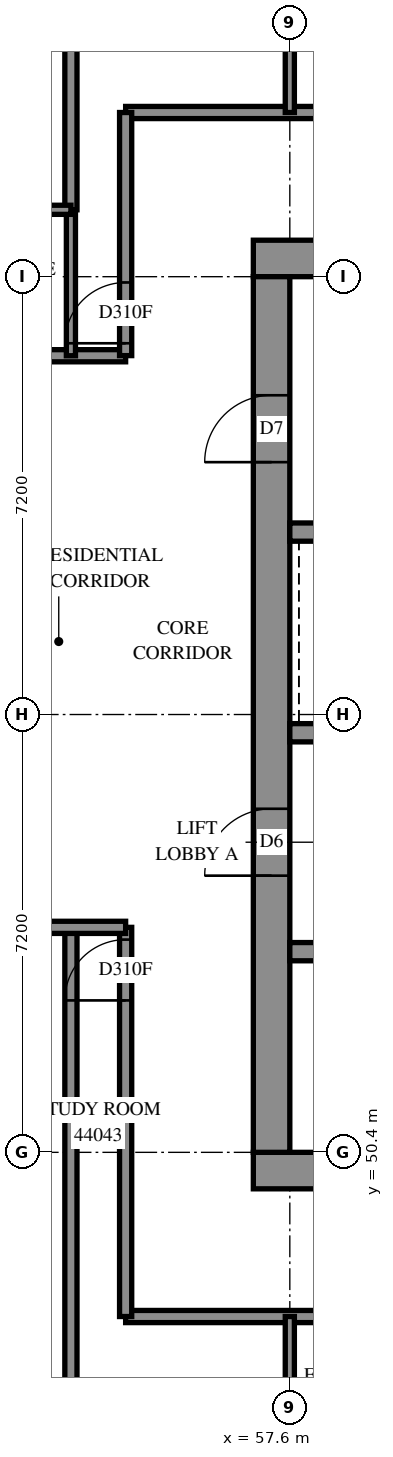
"""IFC4 building model, lengths in metres.
Left out: names, types, materials, properties, quantities, classifications, styles, units other than length and angle.
Written with IfcOpenShell. Run it as: python <this file> out.ifc"""

import sys

from ifc_helpers import new_model, si_unit, direction, frame, frame_2d, origin, place, context, subcontext, project, spatial, rectangle, extrude, element, fill, save


model = new_model("IFC4")
c1 = context("Model", 3, precision=1e-05, world=origin(), true_north=direction((0.0, 1.0)))
c2 = subcontext(c1, "Body", "Model", "MODEL_VIEW")
j1 = project(units=[si_unit("LENGTHUNIT", "METRE"), si_unit("PLANEANGLEUNIT", "RADIAN")], contexts=[c1])
p1 = place(None, origin())
s1 = spatial("IfcSite", under=j1, at=p1, CompositionType="ELEMENT")
p2 = place(p1, origin())
s2 = spatial("IfcBuilding", under=s1, at=p2, CompositionType="ELEMENT")
p3 = place(p2, frame((0.0, 0.0, 162.6)))
s3 = spatial("IfcBuildingStorey", under=s2, at=p3, CompositionType="ELEMENT", Elevation=162.6)
p4 = place(p3, frame((57.0, 50.1, -0.3), z_axis=(0.0, 0.0, 1.0), x_axis=(1.0, 0.0, 0.0)))
e1 = element("IfcWall", 1, at=p4, inside=s3, PredefinedType="SHEAR", context=c2, shape_type="SweptSolid", body=[
    extrude(rectangle(XDim=15.6, YDim=0.6, at=frame_2d((7.8, 0.0))), origin(), (0.0, 0.0, 1.0), 2.7),
])
p5 = place(p3, frame((57.0, 65.1, -0.3), z_axis=(0.0, 0.0, 1.0), x_axis=(1.0, 0.0, 0.0)))
e2 = element("IfcWall", 2, at=p5, inside=s3, PredefinedType="SHEAR", context=c2, shape_type="SweptSolid", body=[
    extrude(rectangle(XDim=15.6, YDim=0.6, at=frame_2d((7.8, 0.0))), origin(), (0.0, 0.0, 1.0), 2.7),
])
p6 = place(p5, frame((10.6, 0.0, 0.3)))
e3 = element("IfcOpeningElement", 3, at=p6, cuts=e2, PredefinedType="OPENING", context=c2, shape_type="SweptSolid", body=[
    extrude(rectangle(XDim=0.8, YDim=2.1, at=frame_2d((0.4, 1.05))), frame((0.0, 0.31, 0.0), z_axis=(0.0, -1.0, 0.0), x_axis=(1.0, 0.0, 0.0)), (0.0, 0.0, 1.0), 0.62),
])
p7 = place(p3, frame((57.3, 50.4, -0.3), z_axis=(0.0, 0.0, 1.0), x_axis=(0.0, 1.0, 0.0)))
e4 = element("IfcWall", 4, at=p7, inside=s3, PredefinedType="SHEAR", context=c2, shape_type="SweptSolid", body=[
    extrude(rectangle(XDim=14.4, YDim=0.6, at=frame_2d((7.2, 0.0))), origin(), (0.0, 0.0, 1.0), 2.7),
])
p8 = place(p7, frame((4.55, 0.0, 0.3)))
e5 = element("IfcOpeningElement", 5, at=p8, cuts=e4, PredefinedType="OPENING", context=c2, shape_type="SweptSolid", body=[
    extrude(rectangle(XDim=1.1, YDim=2.1, at=frame_2d((0.55, 1.05))), frame((0.0, 0.31, 0.0), z_axis=(0.0, -1.0, 0.0), x_axis=(1.0, 0.0, 0.0)), (0.0, 0.0, 1.0), 0.62),
])
p9 = place(p7, frame((11.35, 0.0, 0.3)))
e6 = element("IfcOpeningElement", 6, at=p9, cuts=e4, PredefinedType="OPENING", context=c2, shape_type="SweptSolid", body=[
    extrude(rectangle(XDim=1.1, YDim=2.1, at=frame_2d((0.55, 1.05))), frame((0.0, 0.31, 0.0), z_axis=(0.0, -1.0, 0.0), x_axis=(1.0, 0.0, 0.0)), (0.0, 0.0, 1.0), 0.62),
])
p10 = place(p3, frame((57.6, 53.7, 0.0), z_axis=(0.0, 0.0, 1.0), x_axis=(1.0, 0.0, 0.0)))
e7 = element("IfcWall", 7, at=p10, inside=s3, PredefinedType="SOLIDWALL", context=c2, shape_type="SweptSolid", body=[
    extrude(rectangle(XDim=14.4, YDim=0.3, at=frame_2d((7.2, 0.0))), origin(), (0.0, 0.0, 1.0), 3.1),
])
p11 = place(p10, frame((1.35, 0.0, 0.0)))
e8 = element("IfcOpeningElement", 8, at=p11, cuts=e7, PredefinedType="OPENING", context=c2, shape_type="SweptSolid", body=[
    extrude(rectangle(XDim=0.9, YDim=2.1, at=frame_2d((0.45, 1.05))), frame((0.0, 0.16, 0.0), z_axis=(0.0, -1.0, 0.0), x_axis=(1.0, 0.0, 0.0)), (0.0, 0.0, 1.0), 0.32),
])
p12 = place(p10, frame((4.95, 0.0, 0.0)))
e9 = element("IfcOpeningElement", 9, at=p12, cuts=e7, PredefinedType="OPENING", context=c2, shape_type="SweptSolid", body=[
    extrude(rectangle(XDim=0.9, YDim=2.1, at=frame_2d((0.45, 1.05))), frame((0.0, 0.16, 0.0), z_axis=(0.0, -1.0, 0.0), x_axis=(1.0, 0.0, 0.0)), (0.0, 0.0, 1.0), 0.32),
])
p13 = place(p10, frame((8.55, 0.0, 0.0)))
e10 = element("IfcOpeningElement", 10, at=p13, cuts=e7, PredefinedType="OPENING", context=c2, shape_type="SweptSolid", body=[
    extrude(rectangle(XDim=0.9, YDim=2.1, at=frame_2d((0.45, 1.05))), frame((0.0, 0.16, 0.0), z_axis=(0.0, -1.0, 0.0), x_axis=(1.0, 0.0, 0.0)), (0.0, 0.0, 1.0), 0.32),
])
p14 = place(p10, frame((12.05, 0.0, 0.0)))
e11 = element("IfcOpeningElement", 11, at=p14, cuts=e7, PredefinedType="OPENING", context=c2, shape_type="SweptSolid", body=[
    extrude(rectangle(XDim=1.1, YDim=2.1, at=frame_2d((0.55, 1.05))), frame((0.0, 0.16, 0.0), z_axis=(0.0, -1.0, 0.0), x_axis=(1.0, 0.0, 0.0)), (0.0, 0.0, 1.0), 0.32),
])
p15 = place(p3, frame((57.6, 57.3, 0.0), z_axis=(0.0, 0.0, 1.0), x_axis=(1.0, 0.0, 0.0)))
e12 = element("IfcWall", 12, at=p15, inside=s3, PredefinedType="SOLIDWALL", context=c2, shape_type="SweptSolid", body=[
    extrude(rectangle(XDim=14.4, YDim=0.3, at=frame_2d((7.2, 0.0))), origin(), (0.0, 0.0, 1.0), 3.1),
])
p16 = place(p15, frame((1.25, 0.0, 0.0)))
e13 = element("IfcOpeningElement", 13, at=p16, cuts=e12, PredefinedType="OPENING", context=c2, shape_type="SweptSolid", body=[
    extrude(rectangle(XDim=1.1, YDim=2.1, at=frame_2d((0.55, 1.05))), frame((0.0, 0.16, 0.0), z_axis=(0.0, -1.0, 0.0), x_axis=(1.0, 0.0, 0.0)), (0.0, 0.0, 1.0), 0.32),
])
p17 = place(p15, frame((4.85, 0.0, 0.0)))
e14 = element("IfcOpeningElement", 14, at=p17, cuts=e12, PredefinedType="OPENING", context=c2, shape_type="SweptSolid", body=[
    extrude(rectangle(XDim=1.1, YDim=2.1, at=frame_2d((0.55, 1.05))), frame((0.0, 0.16, 0.0), z_axis=(0.0, -1.0, 0.0), x_axis=(1.0, 0.0, 0.0)), (0.0, 0.0, 1.0), 0.32),
])
p18 = place(p15, frame((8.45, 0.0, 0.0)))
e15 = element("IfcOpeningElement", 15, at=p18, cuts=e12, PredefinedType="OPENING", context=c2, shape_type="SweptSolid", body=[
    extrude(rectangle(XDim=1.1, YDim=2.1, at=frame_2d((0.55, 1.05))), frame((0.0, 0.16, 0.0), z_axis=(0.0, -1.0, 0.0), x_axis=(1.0, 0.0, 0.0)), (0.0, 0.0, 1.0), 0.32),
])
p19 = place(p15, frame((12.05, 0.0, 0.0)))
e16 = element("IfcOpeningElement", 16, at=p19, cuts=e12, PredefinedType="OPENING", context=c2, shape_type="SweptSolid", body=[
    extrude(rectangle(XDim=1.1, YDim=2.1, at=frame_2d((0.55, 1.05))), frame((0.0, 0.16, 0.0), z_axis=(0.0, -1.0, 0.0), x_axis=(1.0, 0.0, 0.0)), (0.0, 0.0, 1.0), 0.32),
])
p20 = place(p3, frame((57.6, 60.6, 0.0), z_axis=(0.0, 0.0, 1.0), x_axis=(1.0, 0.0, 0.0)))
e17 = element("IfcWall", 17, at=p20, inside=s3, PredefinedType="SOLIDWALL", context=c2, shape_type="SweptSolid", body=[
    extrude(rectangle(XDim=7.2, YDim=0.3, at=frame_2d((3.6, 0.0))), origin(), (0.0, 0.0, 1.0), 3.1),
])
p21 = place(p3, frame((54.9, 67.5, 0.0), z_axis=(0.0, 0.0, 1.0), x_axis=(1.0, 0.0, 0.0)))
e18 = element("IfcWall", 18, at=p21, inside=s3, PredefinedType="PARTITIONING", context=c2, shape_type="SweptSolid", body=[
    extrude(rectangle(XDim=19.8, YDim=0.2, at=frame_2d((9.9, 0.0))), origin(), (0.0, 0.0, 1.0), 3.1),
])
p22 = place(p21, frame((6.599, 0.0, 0.0)))
e19 = element("IfcOpeningElement", 19, at=p22, cuts=e18, PredefinedType="OPENING", context=c2, shape_type="SweptSolid", body=[
    extrude(rectangle(XDim=0.9, YDim=2.1, at=frame_2d((0.45, 1.05))), frame((0.0, 0.11, 0.0), z_axis=(0.0, -1.0, 0.0), x_axis=(1.0, 0.0, 0.0)), (0.0, 0.0, 1.0), 0.22),
])
p23 = place(p21, frame((14.101, 0.0, 0.0)))
e20 = element("IfcOpeningElement", 20, at=p23, cuts=e18, PredefinedType="OPENING", context=c2, shape_type="SweptSolid", body=[
    extrude(rectangle(XDim=0.9, YDim=2.1, at=frame_2d((0.45, 1.05))), frame((0.0, 0.11, 0.0), z_axis=(0.0, -1.0, 0.0), x_axis=(1.0, 0.0, 0.0)), (0.0, 0.0, 1.0), 0.22),
])
p24 = place(p3, frame((54.9, 47.7, 0.0), z_axis=(0.0, 0.0, 1.0), x_axis=(1.0, 0.0, 0.0)))
e21 = element("IfcWall", 21, at=p24, inside=s3, PredefinedType="PARTITIONING", context=c2, shape_type="SweptSolid", body=[
    extrude(rectangle(XDim=19.326, YDim=0.2, at=frame_2d((9.663, 0.0))), origin(), (0.0, 0.0, 1.0), 3.1),
])
p25 = place(p24, frame((6.599, 0.0, 0.0)))
e22 = element("IfcOpeningElement", 22, at=p25, cuts=e21, PredefinedType="OPENING", context=c2, shape_type="SweptSolid", body=[
    extrude(rectangle(XDim=0.9, YDim=2.1, at=frame_2d((0.45, 1.05))), frame((0.0, 0.11, 0.0), z_axis=(0.0, -1.0, 0.0), x_axis=(1.0, 0.0, 0.0)), (0.0, 0.0, 1.0), 0.22),
])
p26 = place(p24, frame((13.799, 0.0, 0.0)))
e23 = element("IfcOpeningElement", 23, at=p26, cuts=e21, PredefinedType="OPENING", context=c2, shape_type="SweptSolid", body=[
    extrude(rectangle(XDim=0.9, YDim=2.1, at=frame_2d((0.45, 1.05))), frame((0.0, 0.11, 0.0), z_axis=(0.0, -1.0, 0.0), x_axis=(1.0, 0.0, 0.0)), (0.0, 0.0, 1.0), 0.22),
])
p27 = place(p3, frame((40.702, 63.5, 0.0), z_axis=(0.0, 0.0, 1.0), x_axis=(1.0, 0.0, 0.0)))
e24 = element("IfcWall", 24, at=p27, inside=s3, PredefinedType="PARTITIONING", context=c2, shape_type="SweptSolid", body=[
    extrude(rectangle(XDim=14.198, YDim=0.2, at=frame_2d((7.099, 0.0))), origin(), (0.0, 0.0, 1.0), 3.1),
])
p28 = place(p27, frame((6.692, 0.0, 0.0)))
e25 = element("IfcOpeningElement", 25, at=p28, cuts=e24, PredefinedType="OPENING", context=c2, shape_type="SweptSolid", body=[
    extrude(rectangle(XDim=0.9, YDim=2.1, at=frame_2d((0.45, 1.05))), frame((0.0, 0.11, 0.0), z_axis=(0.0, -1.0, 0.0), x_axis=(1.0, 0.0, 0.0)), (0.0, 0.0, 1.0), 0.22),
])
p29 = place(p27, frame((10.25, 0.0, 0.0)))
e26 = element("IfcOpeningElement", 26, at=p29, cuts=e24, PredefinedType="OPENING", context=c2, shape_type="SweptSolid", body=[
    extrude(rectangle(XDim=0.9, YDim=2.1, at=frame_2d((0.45, 1.05))), frame((0.0, 0.11, 0.0), z_axis=(0.0, -1.0, 0.0), x_axis=(1.0, 0.0, 0.0)), (0.0, 0.0, 1.0), 0.22),
])
p30 = place(p3, frame((54.0, 42.285, 0.0), z_axis=(0.0, 0.0, 1.0), x_axis=(0.0, 1.0, 0.0)))
e27 = element("IfcWall", 27, at=p30, inside=s3, PredefinedType="PARTITIONING", context=c2, shape_type="SweptSolid", body=[
    extrude(rectangle(XDim=11.815, YDim=0.2, at=frame_2d((5.907, 0.0))), origin(), (0.0, 0.0, 1.0), 3.1),
])
p31 = place(p3, frame((54.0, 65.9, 0.0), z_axis=(0.0, 0.0, 1.0), x_axis=(0.0, 1.0, 0.0)))
e28 = element("IfcWall", 28, at=p31, inside=s3, PredefinedType="PARTITIONING", context=c2, shape_type="SweptSolid", body=[
    extrude(rectangle(XDim=6.863, YDim=0.2, at=frame_2d((3.432, 0.0))), origin(), (0.0, 0.0, 1.0), 3.1),
])
p32 = place(p3, frame((54.9, 47.7, 0.0), z_axis=(0.0, 0.0, 1.0), x_axis=(0.0, 1.0, 0.0)))
e29 = element("IfcWall", 29, at=p32, inside=s3, PredefinedType="PARTITIONING", context=c2, shape_type="SweptSolid", body=[
    extrude(rectangle(XDim=6.4, YDim=0.2, at=frame_2d((3.2, 0.0))), origin(), (0.0, 0.0, 1.0), 3.1),
])
p33 = place(p32, frame((5.199, 0.0, 0.0)))
e30 = element("IfcOpeningElement", 30, at=p33, cuts=e29, PredefinedType="OPENING", context=c2, shape_type="SweptSolid", body=[
    extrude(rectangle(XDim=1.0, YDim=2.1, at=frame_2d((0.5, 1.05))), frame((0.0, 0.11, 0.0), z_axis=(0.0, -1.0, 0.0), x_axis=(1.0, 0.0, 0.0)), (0.0, 0.0, 1.0), 0.22),
])
p34 = place(p3, frame((50.4, 54.1, 0.0), z_axis=(0.0, 0.0, 1.0), x_axis=(1.0, 0.0, 0.0)))
e31 = element("IfcWall", 31, at=p34, inside=s3, PredefinedType="PARTITIONING", context=c2, shape_type="SweptSolid", body=[
    extrude(rectangle(XDim=4.5, YDim=0.2, at=frame_2d((2.25, 0.0))), origin(), (0.0, 0.0, 1.0), 3.1),
])
p35 = place(p34, frame((2.3, 0.0, 0.0)))
e32 = element("IfcOpeningElement", 32, at=p35, cuts=e31, PredefinedType="OPENING", context=c2, shape_type="SweptSolid", body=[
    extrude(rectangle(XDim=0.9, YDim=2.1, at=frame_2d((0.45, 1.05))), frame((0.0, 0.11, 0.0), z_axis=(0.0, -1.0, 0.0), x_axis=(1.0, 0.0, 0.0)), (0.0, 0.0, 1.0), 0.22),
])
p36 = place(p3, frame((54.9, 63.502, 0.0), z_axis=(0.0, 0.0, 1.0), x_axis=(0.0, 1.0, 0.0)))
e33 = element("IfcWall", 33, at=p36, inside=s3, PredefinedType="PARTITIONING", context=c2, shape_type="SweptSolid", body=[
    extrude(rectangle(XDim=3.998, YDim=0.2, at=frame_2d((1.999, 0.0))), origin(), (0.0, 0.0, 1.0), 3.1),
])
p37 = place(p36, frame((0.203, 0.0, 0.0)))
e34 = element("IfcOpeningElement", 34, at=p37, cuts=e33, PredefinedType="OPENING", context=c2, shape_type="SweptSolid", body=[
    extrude(rectangle(XDim=1.0, YDim=2.1, at=frame_2d((0.5, 1.05))), frame((0.0, 0.11, 0.0), z_axis=(0.0, -1.0, 0.0), x_axis=(1.0, 0.0, 0.0)), (0.0, 0.0, 1.0), 0.22),
])
for number, where, z_axis, x_axis in (
    (35, (54.0, 63.5, 0.0), (0.0, 0.0, 1.0), (0.0, 1.0, 0.0)),
    (36, (57.6, 45.3, 0.0), (0.0, 0.0, 1.0), (0.0, 1.0, 0.0)),
    (37, (57.6, 67.5, 0.0), (0.0, 0.0, 1.0), (0.0, 1.0, 0.0)),
):
    element("IfcWall", number, at=place(p3, frame(where, z_axis=z_axis, x_axis=x_axis)), inside=s3, PredefinedType="PARTITIONING", context=c2, shape_type="SweptSolid", body=[
        extrude(rectangle(XDim=2.4, YDim=0.15, at=frame_2d((1.2, 0.0))), origin(), (0.0, 0.0, 1.0), 3.1),
    ])
p38 = place(p3, frame((52.1, 65.9, 0.0), z_axis=(0.0, 0.0, 1.0), x_axis=(1.0, 0.0, 0.0)))
e38 = element("IfcWall", 38, at=p38, inside=s3, PredefinedType="PARTITIONING", context=c2, shape_type="SweptSolid", body=[
    extrude(rectangle(XDim=1.9, YDim=0.15, at=frame_2d((0.95, 0.0))), origin(), (0.0, 0.0, 1.0), 3.1),
])
p39 = place(p38, frame((0.493, 0.0, 0.0)))
e39 = element("IfcOpeningElement", 39, at=p39, cuts=e38, PredefinedType="OPENING", context=c2, shape_type="SweptSolid", body=[
    extrude(rectangle(XDim=0.8, YDim=2.1, at=frame_2d((0.4, 1.05))), frame((0.0, 0.085, 0.0), z_axis=(0.0, -1.0, 0.0), x_axis=(1.0, 0.0, 0.0)), (0.0, 0.0, 1.0), 0.17),
])
p40 = place(p8, origin())
e40 = element("IfcDoor", 40, at=p40, inside=s3, OperationType="DOUBLE_DOOR_SINGLE_SWING", PredefinedType="DOOR", context=c2, shape_type="SweptSolid", body=[
    extrude(rectangle(XDim=1.1, YDim=2.1, at=frame_2d((0.55, 1.05))), frame((0.0, 0.025, 0.0), z_axis=(0.0, -1.0, 0.0), x_axis=(1.0, 0.0, 0.0)), (0.0, 0.0, 1.0), 0.05),
])
fill(e5, e40)
p41 = place(p9, origin())
e41 = element("IfcDoor", 41, at=p41, inside=s3, OperationType="SINGLE_SWING_LEFT", PredefinedType="DOOR", context=c2, shape_type="SweptSolid", body=[
    extrude(rectangle(XDim=1.1, YDim=2.1, at=frame_2d((0.55, 1.05))), frame((0.0, 0.025, 0.0), z_axis=(0.0, -1.0, 0.0), x_axis=(1.0, 0.0, 0.0)), (0.0, 0.0, 1.0), 0.05),
])
fill(e6, e41)
p42 = place(p37, origin())
e42 = element("IfcDoor", 42, at=p42, inside=s3, OperationType="SINGLE_SWING_LEFT", PredefinedType="DOOR", context=c2, shape_type="SweptSolid", body=[
    extrude(rectangle(XDim=1.0, YDim=2.1, at=frame_2d((0.5, 1.05))), frame((0.0, 0.025, 0.0), z_axis=(0.0, -1.0, 0.0), x_axis=(1.0, 0.0, 0.0)), (0.0, 0.0, 1.0), 0.05),
])
fill(e34, e42)
p43 = place(p33, origin())
e43 = element("IfcDoor", 43, at=p43, inside=s3, OperationType="SINGLE_SWING_RIGHT", PredefinedType="DOOR", context=c2, shape_type="SweptSolid", body=[
    extrude(rectangle(XDim=1.0, YDim=2.1, at=frame_2d((0.5, 1.05))), frame((0.0, 0.025, 0.0), z_axis=(0.0, -1.0, 0.0), x_axis=(1.0, 0.0, 0.0)), (0.0, 0.0, 1.0), 0.05),
])
fill(e30, e43)
save(model, sys.argv[1])
